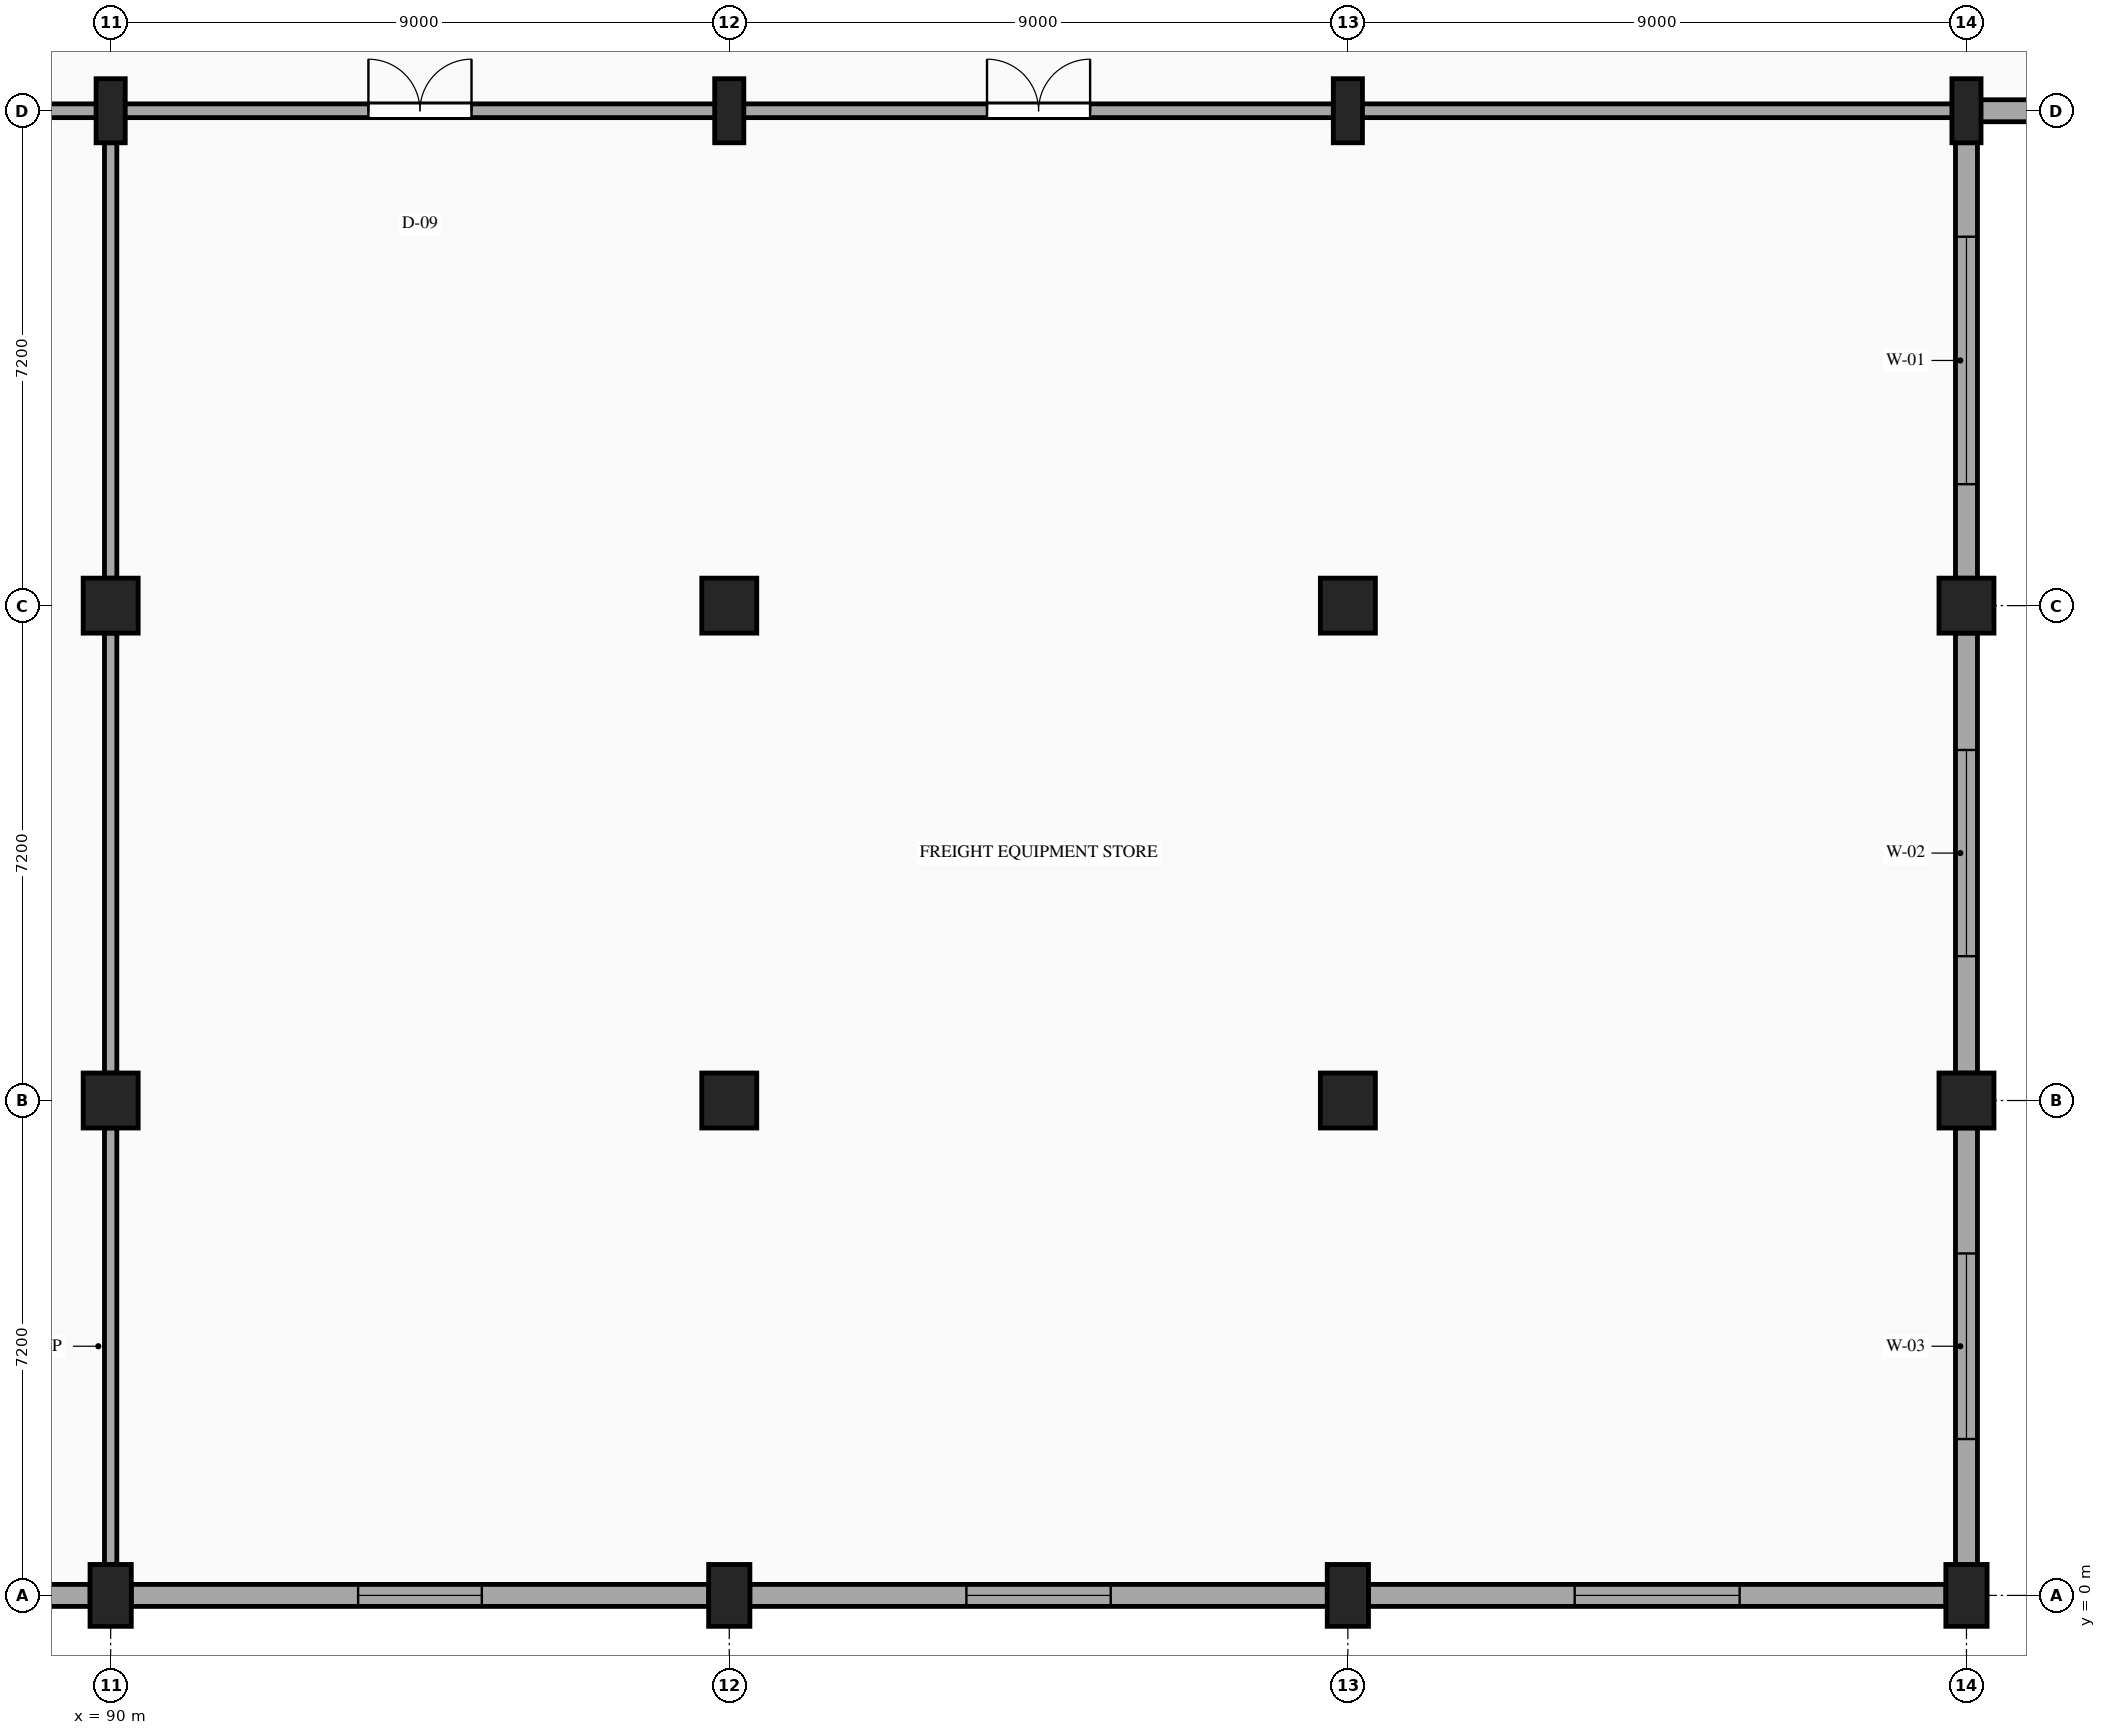
"""IFC4 building model, lengths in metres.
Left out: names, types, materials, properties, quantities, classifications, styles, units other than length and angle.
Written with IfcOpenShell. Run it as: python <this file> out.ifc"""

import sys

from ifc_helpers import new_model, si_unit, direction, frame, frame_2d, origin, origin_2d, place, context, subcontext, project, spatial, rectangle, i_section, extrude, element, fill, save


model = new_model("IFC4")
c1 = context("Model", 3, precision=1e-05, world=origin(), true_north=direction((0.0, 1.0)))
c2 = subcontext(c1, "Body", "Model", "MODEL_VIEW")
j1 = project(units=[si_unit("LENGTHUNIT", "METRE"), si_unit("PLANEANGLEUNIT", "RADIAN")], contexts=[c1])
p1 = place(None, origin())
s1 = spatial("IfcSite", under=j1, at=p1, CompositionType="ELEMENT")
p2 = place(p1, origin())
s2 = spatial("IfcBuilding", under=s1, at=p2, CompositionType="ELEMENT")
p3 = place(p2, origin())
s3 = spatial("IfcBuildingStorey", under=s2, at=p3, CompositionType="ELEMENT", Elevation=0.0)
p4 = place(p3, frame((90.0, 0.0, 0.0), z_axis=(0.0, 0.0, 1.0), x_axis=(1.0, 0.0, 0.0)))
e1 = element("IfcColumn", 1, at=p4, inside=s3, PredefinedType="COLUMN", context=c2, shape_type="SweptSolid", body=[
    extrude(rectangle(XDim=0.6, YDim=0.9, at=origin_2d()), origin(), (0.0, 0.0, 1.0), 5.4),
])
for number, where, z_axis, x_axis in (
    (2, (90.0, 7.2, 0.0), (0.0, 0.0, 1.0), (1.0, 0.0, 0.0)),
    (3, (90.0, 14.4, 0.0), (0.0, 0.0, 1.0), (1.0, 0.0, 0.0)),
):
    element("IfcColumn", number, at=place(p3, frame(where, z_axis=z_axis, x_axis=x_axis)), inside=s3, PredefinedType="COLUMN", context=c2, shape_type="SweptSolid", body=[
        extrude(rectangle(XDim=0.8, YDim=0.8, at=origin_2d()), origin(), (0.0, 0.0, 1.0), 5.4),
    ])
p5 = place(p3, frame((90.0, 21.6, 0.0), z_axis=(0.0, 0.0, 1.0), x_axis=(1.0, 0.0, 0.0)))
e4 = element("IfcColumn", 4, at=p5, inside=s3, PredefinedType="COLUMN", context=c2, shape_type="SweptSolid", body=[
    extrude(i_section(OverallWidth=0.424, OverallDepth=0.932, WebThickness=0.024, FlangeThickness=0.043, at=origin_2d()), origin(), (0.0, 0.0, 1.0), 5.4),
])
p6 = place(p3, frame((99.0, 0.0, 0.0), z_axis=(0.0, 0.0, 1.0), x_axis=(1.0, 0.0, 0.0)))
e5 = element("IfcColumn", 5, at=p6, inside=s3, PredefinedType="COLUMN", context=c2, shape_type="SweptSolid", body=[
    extrude(rectangle(XDim=0.6, YDim=0.9, at=origin_2d()), origin(), (0.0, 0.0, 1.0), 5.4),
])
for number, where, z_axis, x_axis in (
    (6, (99.0, 7.2, 0.0), (0.0, 0.0, 1.0), (1.0, 0.0, 0.0)),
    (7, (99.0, 14.4, 0.0), (0.0, 0.0, 1.0), (1.0, 0.0, 0.0)),
):
    element("IfcColumn", number, at=place(p3, frame(where, z_axis=z_axis, x_axis=x_axis)), inside=s3, PredefinedType="COLUMN", context=c2, shape_type="SweptSolid", body=[
        extrude(rectangle(XDim=0.8, YDim=0.8, at=origin_2d()), origin(), (0.0, 0.0, 1.0), 5.4),
    ])
p7 = place(p3, frame((99.0, 21.6, 0.0), z_axis=(0.0, 0.0, 1.0), x_axis=(1.0, 0.0, 0.0)))
e8 = element("IfcColumn", 8, at=p7, inside=s3, PredefinedType="COLUMN", context=c2, shape_type="SweptSolid", body=[
    extrude(i_section(OverallWidth=0.424, OverallDepth=0.932, WebThickness=0.024, FlangeThickness=0.043, at=origin_2d()), origin(), (0.0, 0.0, 1.0), 5.4),
])
p8 = place(p3, frame((108.0, 0.0, 0.0), z_axis=(0.0, 0.0, 1.0), x_axis=(1.0, 0.0, 0.0)))
e9 = element("IfcColumn", 9, at=p8, inside=s3, PredefinedType="COLUMN", context=c2, shape_type="SweptSolid", body=[
    extrude(rectangle(XDim=0.6, YDim=0.9, at=origin_2d()), origin(), (0.0, 0.0, 1.0), 5.4),
])
for number, where, z_axis, x_axis in (
    (10, (108.0, 7.2, 0.0), (0.0, 0.0, 1.0), (1.0, 0.0, 0.0)),
    (11, (108.0, 14.4, 0.0), (0.0, 0.0, 1.0), (1.0, 0.0, 0.0)),
):
    element("IfcColumn", number, at=place(p3, frame(where, z_axis=z_axis, x_axis=x_axis)), inside=s3, PredefinedType="COLUMN", context=c2, shape_type="SweptSolid", body=[
        extrude(rectangle(XDim=0.8, YDim=0.8, at=origin_2d()), origin(), (0.0, 0.0, 1.0), 5.4),
    ])
p9 = place(p3, frame((108.0, 21.6, 0.0), z_axis=(0.0, 0.0, 1.0), x_axis=(1.0, 0.0, 0.0)))
e12 = element("IfcColumn", 12, at=p9, inside=s3, PredefinedType="COLUMN", context=c2, shape_type="SweptSolid", body=[
    extrude(i_section(OverallWidth=0.424, OverallDepth=0.932, WebThickness=0.024, FlangeThickness=0.043, at=origin_2d()), origin(), (0.0, 0.0, 1.0), 5.4),
])
p10 = place(p3, frame((117.0, 0.0, 0.0), z_axis=(0.0, 0.0, 1.0), x_axis=(1.0, 0.0, 0.0)))
e13 = element("IfcColumn", 13, at=p10, inside=s3, PredefinedType="COLUMN", context=c2, shape_type="SweptSolid", body=[
    extrude(rectangle(XDim=0.6, YDim=0.9, at=origin_2d()), origin(), (0.0, 0.0, 1.0), 5.4),
])
for number, where, z_axis, x_axis in (
    (14, (117.0, 7.2, 0.0), (0.0, 0.0, 1.0), (1.0, 0.0, 0.0)),
    (15, (117.0, 14.4, 0.0), (0.0, 0.0, 1.0), (1.0, 0.0, 0.0)),
):
    element("IfcColumn", number, at=place(p3, frame(where, z_axis=z_axis, x_axis=x_axis)), inside=s3, PredefinedType="COLUMN", context=c2, shape_type="SweptSolid", body=[
        extrude(rectangle(XDim=0.8, YDim=0.8, at=origin_2d()), origin(), (0.0, 0.0, 1.0), 5.4),
    ])
p11 = place(p3, frame((117.0, 21.6, 0.0), z_axis=(0.0, 0.0, 1.0), x_axis=(1.0, 0.0, 0.0)))
e16 = element("IfcColumn", 16, at=p11, inside=s3, PredefinedType="COLUMN", context=c2, shape_type="SweptSolid", body=[
    extrude(i_section(OverallWidth=0.424, OverallDepth=0.932, WebThickness=0.024, FlangeThickness=0.043, at=origin_2d()), origin(), (0.0, 0.0, 1.0), 5.4),
])
p12 = place(p3, frame((125.99, 21.6, 0.0), z_axis=(0.0, 0.0, 1.0), x_axis=(-1.0, 0.0, 0.0)))
e17 = element("IfcWall", 17, at=p12, inside=s3, PredefinedType="STANDARD", context=c2, shape_type="SweptSolid", body=[
    extrude(rectangle(XDim=8.98, YDim=0.32, at=frame_2d((4.49, 0.0))), origin(), (0.0, 0.0, 1.0), 4.747),
])
p13 = place(p12, frame((2.39, 0.0, 0.9)))
e18 = element("IfcOpeningElement", 18, at=p13, cuts=e17, PredefinedType="OPENING", context=c2, shape_type="SweptSolid", body=[
    extrude(rectangle(XDim=4.2, YDim=1.5, at=frame_2d((2.1, 0.75))), frame((0.0, 0.17, 0.0), z_axis=(0.0, -1.0, 0.0), x_axis=(1.0, 0.0, 0.0)), (0.0, 0.0, 1.0), 0.34),
])
p14 = place(p3, frame((117.0, 21.136, 0.0), z_axis=(0.0, 0.0, 1.0), x_axis=(0.0, -1.0, 0.0)))
e19 = element("IfcWall", 19, at=p14, inside=s3, PredefinedType="STANDARD", context=c2, shape_type="SweptSolid", body=[
    extrude(rectangle(XDim=6.338, YDim=0.32, at=frame_2d((3.169, 0.0))), origin(), (0.0, 0.0, 1.0), 4.86),
])
p15 = place(p14, frame((1.369, 0.0, 0.9)))
e20 = element("IfcOpeningElement", 20, at=p15, cuts=e19, PredefinedType="OPENING", context=c2, shape_type="SweptSolid", body=[
    extrude(rectangle(XDim=3.6, YDim=2.1, at=frame_2d((1.8, 1.05))), frame((0.0, 0.17, 0.0), z_axis=(0.0, -1.0, 0.0), x_axis=(1.0, 0.0, 0.0)), (0.0, 0.0, 1.0), 0.34),
])
p16 = place(p3, frame((117.0, 14.002, 0.0), z_axis=(0.0, 0.0, 1.0), x_axis=(0.0, -1.0, 0.0)))
e21 = element("IfcWall", 21, at=p16, inside=s3, PredefinedType="STANDARD", context=c2, shape_type="SweptSolid", body=[
    extrude(rectangle(XDim=6.404, YDim=0.32, at=frame_2d((3.202, 0.0))), origin(), (0.0, 0.0, 1.0), 4.86),
])
p17 = place(p16, frame((1.702, 0.0, 0.9)))
e22 = element("IfcOpeningElement", 22, at=p17, cuts=e21, PredefinedType="OPENING", context=c2, shape_type="SweptSolid", body=[
    extrude(rectangle(XDim=3.0, YDim=2.1, at=frame_2d((1.5, 1.05))), frame((0.0, 0.17, 0.0), z_axis=(0.0, -1.0, 0.0), x_axis=(1.0, 0.0, 0.0)), (0.0, 0.0, 1.0), 0.34),
])
p18 = place(p3, frame((117.0, 6.802, 0.0), z_axis=(0.0, 0.0, 1.0), x_axis=(0.0, -1.0, 0.0)))
e23 = element("IfcWall", 23, at=p18, inside=s3, PredefinedType="STANDARD", context=c2, shape_type="SweptSolid", body=[
    extrude(rectangle(XDim=6.354, YDim=0.32, at=frame_2d((3.177, 0.0))), origin(), (0.0, 0.0, 1.0), 4.86),
])
p19 = place(p18, frame((1.827, 0.0, 0.9)))
e24 = element("IfcOpeningElement", 24, at=p19, cuts=e23, PredefinedType="OPENING", context=c2, shape_type="SweptSolid", body=[
    extrude(rectangle(XDim=2.7, YDim=2.0, at=frame_2d((1.35, 1.0))), frame((0.0, 0.17, 0.0), z_axis=(0.0, -1.0, 0.0), x_axis=(1.0, 0.0, 0.0)), (0.0, 0.0, 1.0), 0.34),
])
p20 = place(p3, frame((116.702, 0.0, 0.0), z_axis=(0.0, 0.0, 1.0), x_axis=(-1.0, 0.0, 0.0)))
e25 = element("IfcWall", 25, at=p20, inside=s3, PredefinedType="STANDARD", context=c2, shape_type="SweptSolid", body=[
    extrude(rectangle(XDim=8.404, YDim=0.32, at=frame_2d((4.202, 0.0))), origin(), (0.0, 0.0, 1.0), 4.787),
])
p21 = place(p20, frame((3.002, 0.0, 0.9)))
e26 = element("IfcOpeningElement", 26, at=p21, cuts=e25, PredefinedType="OPENING", context=c2, shape_type="SweptSolid", body=[
    extrude(rectangle(XDim=2.4, YDim=2.0, at=frame_2d((1.2, 1.0))), frame((0.0, 0.17, 0.0), z_axis=(0.0, -1.0, 0.0), x_axis=(1.0, 0.0, 0.0)), (0.0, 0.0, 1.0), 0.34),
])
p22 = place(p3, frame((107.702, 0.0, 0.0), z_axis=(0.0, 0.0, 1.0), x_axis=(-1.0, 0.0, 0.0)))
e27 = element("IfcWall", 27, at=p22, inside=s3, PredefinedType="STANDARD", context=c2, shape_type="SweptSolid", body=[
    extrude(rectangle(XDim=8.404, YDim=0.32, at=frame_2d((4.202, 0.0))), origin(), (0.0, 0.0, 1.0), 4.787),
])
p23 = place(p22, frame((3.152, 0.0, 0.9)))
e28 = element("IfcOpeningElement", 28, at=p23, cuts=e27, PredefinedType="OPENING", context=c2, shape_type="SweptSolid", body=[
    extrude(rectangle(XDim=2.1, YDim=1.8, at=frame_2d((1.05, 0.9))), frame((0.0, 0.17, 0.0), z_axis=(0.0, -1.0, 0.0), x_axis=(1.0, 0.0, 0.0)), (0.0, 0.0, 1.0), 0.34),
])
p24 = place(p3, frame((98.702, 0.0, 0.0), z_axis=(0.0, 0.0, 1.0), x_axis=(-1.0, 0.0, 0.0)))
e29 = element("IfcWall", 29, at=p24, inside=s3, PredefinedType="STANDARD", context=c2, shape_type="SweptSolid", body=[
    extrude(rectangle(XDim=8.404, YDim=0.32, at=frame_2d((4.202, 0.0))), origin(), (0.0, 0.0, 1.0), 4.703),
])
p25 = place(p24, frame((3.302, 0.0, 0.9)))
e30 = element("IfcOpeningElement", 30, at=p25, cuts=e29, PredefinedType="OPENING", context=c2, shape_type="SweptSolid", body=[
    extrude(rectangle(XDim=1.8, YDim=1.8, at=frame_2d((0.9, 0.9))), frame((0.0, 0.17, 0.0), z_axis=(0.0, -1.0, 0.0), x_axis=(1.0, 0.0, 0.0)), (0.0, 0.0, 1.0), 0.34),
])
p26 = place(p3, frame((89.702, 0.0, 0.0), z_axis=(0.0, 0.0, 1.0), x_axis=(-1.0, 0.0, 0.0)))
e31 = element("IfcWall", 31, at=p26, inside=s3, PredefinedType="STANDARD", context=c2, shape_type="SweptSolid", body=[
    extrude(rectangle(XDim=8.404, YDim=0.32, at=frame_2d((4.202, 0.0))), origin(), (0.0, 0.0, 1.0), 4.043),
])
p27 = place(p26, frame((2.102, 0.0, 0.0)))
e32 = element("IfcOpeningElement", 32, at=p27, cuts=e31, PredefinedType="OPENING", context=c2, shape_type="SweptSolid", body=[
    extrude(rectangle(XDim=4.2, YDim=3.69, at=frame_2d((2.1, 1.845))), frame((0.0, 0.17, 0.0), z_axis=(0.0, -1.0, 0.0), x_axis=(1.0, 0.0, 0.0)), (0.0, 0.0, 1.0), 0.34),
])
p28 = place(p3, frame((81.01, 21.6, 0.0), z_axis=(0.0, 0.0, 1.0), x_axis=(1.0, 0.0, 0.0)))
e33 = element("IfcWall", 33, at=p28, inside=s3, PredefinedType="PARTITIONING", context=c2, shape_type="SweptSolid", body=[
    extrude(rectangle(XDim=8.98, YDim=0.2, at=frame_2d((4.49, 0.0))), origin(), (0.0, 0.0, 1.0), 4.754),
])
p29 = place(p3, frame((90.01, 21.6, 0.0), z_axis=(0.0, 0.0, 1.0), x_axis=(1.0, 0.0, 0.0)))
e34 = element("IfcWall", 34, at=p29, inside=s3, PredefinedType="PARTITIONING", context=c2, shape_type="SweptSolid", body=[
    extrude(rectangle(XDim=8.98, YDim=0.2, at=frame_2d((4.49, 0.0))), origin(), (0.0, 0.0, 1.0), 4.693),
])
p30 = place(p29, frame((3.74, 0.0, 0.0)))
e35 = element("IfcOpeningElement", 35, at=p30, cuts=e34, PredefinedType="OPENING", context=c2, shape_type="SweptSolid", body=[
    extrude(rectangle(XDim=1.5, YDim=2.25, at=frame_2d((0.75, 1.125))), frame((0.0, 0.11, 0.0), z_axis=(0.0, -1.0, 0.0), x_axis=(1.0, 0.0, 0.0)), (0.0, 0.0, 1.0), 0.22),
])
p31 = place(p3, frame((99.01, 21.6, 0.0), z_axis=(0.0, 0.0, 1.0), x_axis=(1.0, 0.0, 0.0)))
e36 = element("IfcWall", 36, at=p31, inside=s3, PredefinedType="PARTITIONING", context=c2, shape_type="SweptSolid", body=[
    extrude(rectangle(XDim=8.98, YDim=0.2, at=frame_2d((4.49, 0.0))), origin(), (0.0, 0.0, 1.0), 4.787),
])
p32 = place(p31, frame((3.74, 0.0, 0.0)))
e37 = element("IfcOpeningElement", 37, at=p32, cuts=e36, PredefinedType="OPENING", context=c2, shape_type="SweptSolid", body=[
    extrude(rectangle(XDim=1.5, YDim=2.25, at=frame_2d((0.75, 1.125))), frame((0.0, 0.11, 0.0), z_axis=(0.0, -1.0, 0.0), x_axis=(1.0, 0.0, 0.0)), (0.0, 0.0, 1.0), 0.22),
])
p33 = place(p3, frame((108.01, 21.6, 0.0), z_axis=(0.0, 0.0, 1.0), x_axis=(1.0, 0.0, 0.0)))
e38 = element("IfcWall", 38, at=p33, inside=s3, PredefinedType="PARTITIONING", context=c2, shape_type="SweptSolid", body=[
    extrude(rectangle(XDim=8.98, YDim=0.2, at=frame_2d((4.49, 0.0))), origin(), (0.0, 0.0, 1.0), 4.787),
])
p34 = place(p3, frame((90.0, 0.448, 0.0), z_axis=(0.0, 0.0, 1.0), x_axis=(0.0, 1.0, 0.0)))
e39 = element("IfcWall", 39, at=p34, inside=s3, PredefinedType="PARTITIONING", context=c2, shape_type="SweptSolid", body=[
    extrude(rectangle(XDim=6.354, YDim=0.18, at=frame_2d((3.177, 0.0))), origin(), (0.0, 0.0, 1.0), 4.477),
])
p35 = place(p3, frame((90.0, 7.598, 0.0), z_axis=(0.0, 0.0, 1.0), x_axis=(0.0, 1.0, 0.0)))
e40 = element("IfcWall", 40, at=p35, inside=s3, PredefinedType="PARTITIONING", context=c2, shape_type="SweptSolid", body=[
    extrude(rectangle(XDim=6.404, YDim=0.18, at=frame_2d((3.202, 0.0))), origin(), (0.0, 0.0, 1.0), 4.477),
])
p36 = place(p3, frame((90.0, 14.798, 0.0), z_axis=(0.0, 0.0, 1.0), x_axis=(0.0, 1.0, 0.0)))
e41 = element("IfcWall", 41, at=p36, inside=s3, PredefinedType="PARTITIONING", context=c2, shape_type="SweptSolid", body=[
    extrude(rectangle(XDim=6.338, YDim=0.18, at=frame_2d((3.169, 0.0))), origin(), (0.0, 0.0, 1.0), 4.477),
])
p37 = place(p15, origin())
e42 = element("IfcWindow", 42, at=p37, inside=s3, PartitioningType="SINGLE_PANEL", PredefinedType="WINDOW", context=c2, shape_type="SweptSolid", body=[
    extrude(rectangle(XDim=3.6, YDim=2.1, at=frame_2d((1.8, 1.05))), frame((0.0, 0.03, 0.0), z_axis=(0.0, -1.0, 0.0), x_axis=(1.0, 0.0, 0.0)), (0.0, 0.0, 1.0), 0.06),
])
fill(e20, e42)
p38 = place(p17, origin())
e43 = element("IfcWindow", 43, at=p38, inside=s3, PartitioningType="SINGLE_PANEL", PredefinedType="WINDOW", context=c2, shape_type="SweptSolid", body=[
    extrude(rectangle(XDim=3.0, YDim=2.1, at=frame_2d((1.5, 1.05))), frame((0.0, 0.03, 0.0), z_axis=(0.0, -1.0, 0.0), x_axis=(1.0, 0.0, 0.0)), (0.0, 0.0, 1.0), 0.06),
])
fill(e22, e43)
p39 = place(p19, origin())
e44 = element("IfcWindow", 44, at=p39, inside=s3, PartitioningType="SINGLE_PANEL", PredefinedType="WINDOW", context=c2, shape_type="SweptSolid", body=[
    extrude(rectangle(XDim=2.7, YDim=2.0, at=frame_2d((1.35, 1.0))), frame((0.0, 0.03, 0.0), z_axis=(0.0, -1.0, 0.0), x_axis=(1.0, 0.0, 0.0)), (0.0, 0.0, 1.0), 0.06),
])
fill(e24, e44)
p40 = place(p21, origin())
e45 = element("IfcWindow", 45, at=p40, inside=s3, PartitioningType="SINGLE_PANEL", PredefinedType="WINDOW", context=c2, shape_type="SweptSolid", body=[
    extrude(rectangle(XDim=2.4, YDim=2.0, at=frame_2d((1.2, 1.0))), frame((0.0, 0.03, 0.0), z_axis=(0.0, -1.0, 0.0), x_axis=(1.0, 0.0, 0.0)), (0.0, 0.0, 1.0), 0.06),
])
fill(e26, e45)
p41 = place(p23, origin())
e46 = element("IfcWindow", 46, at=p41, inside=s3, PartitioningType="SINGLE_PANEL", PredefinedType="WINDOW", context=c2, shape_type="SweptSolid", body=[
    extrude(rectangle(XDim=2.1, YDim=1.8, at=frame_2d((1.05, 0.9))), frame((0.0, 0.03, 0.0), z_axis=(0.0, -1.0, 0.0), x_axis=(1.0, 0.0, 0.0)), (0.0, 0.0, 1.0), 0.06),
])
fill(e28, e46)
p42 = place(p25, origin())
e47 = element("IfcWindow", 47, at=p42, inside=s3, PartitioningType="SINGLE_PANEL", PredefinedType="WINDOW", context=c2, shape_type="SweptSolid", body=[
    extrude(rectangle(XDim=1.8, YDim=1.8, at=frame_2d((0.9, 0.9))), frame((0.0, 0.03, 0.0), z_axis=(0.0, -1.0, 0.0), x_axis=(1.0, 0.0, 0.0)), (0.0, 0.0, 1.0), 0.06),
])
fill(e30, e47)
p43 = place(p30, origin())
e48 = element("IfcDoor", 48, at=p43, inside=s3, OperationType="DOUBLE_DOOR_SINGLE_SWING", PredefinedType="DOOR", context=c2, shape_type="SweptSolid", body=[
    extrude(rectangle(XDim=1.5, YDim=2.25, at=frame_2d((0.75, 1.125))), frame((0.0, 0.025, 0.0), z_axis=(0.0, -1.0, 0.0), x_axis=(1.0, 0.0, 0.0)), (0.0, 0.0, 1.0), 0.05),
])
fill(e35, e48)
p44 = place(p32, origin())
e49 = element("IfcDoor", 49, at=p44, inside=s3, OperationType="DOUBLE_DOOR_SINGLE_SWING", PredefinedType="DOOR", context=c2, shape_type="SweptSolid", body=[
    extrude(rectangle(XDim=1.5, YDim=2.25, at=frame_2d((0.75, 1.125))), frame((0.0, 0.025, 0.0), z_axis=(0.0, -1.0, 0.0), x_axis=(1.0, 0.0, 0.0)), (0.0, 0.0, 1.0), 0.05),
])
fill(e37, e49)
save(model, sys.argv[1])
